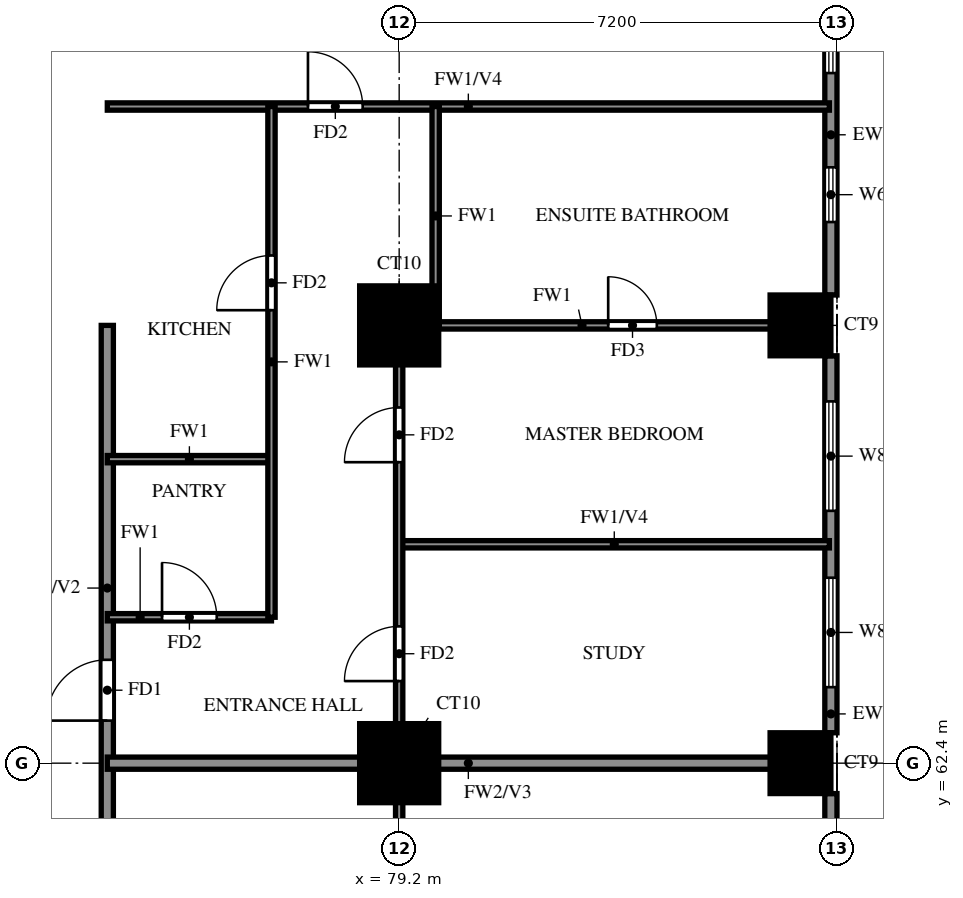
"""IFC4 building model, lengths in metres.
Left out: names, types, materials, properties, quantities, classifications, styles, units other than length and angle.
Written with IfcOpenShell. Run it as: python <this file> out.ifc"""

import sys

from ifc_helpers import new_model, si_unit, direction, frame, frame_2d, origin, origin_2d, place, context, subcontext, project, spatial, rectangle, extrude, source, transform, mapped, element, fill, save


model = new_model("IFC4")
c1 = context("Model", 3, precision=1e-05, world=origin(), true_north=direction((0.0, 1.0)))
c2 = subcontext(c1, "Body", "Model", "MODEL_VIEW")
j1 = project(units=[si_unit("LENGTHUNIT", "METRE"), si_unit("PLANEANGLEUNIT", "RADIAN")], contexts=[c1])
p1 = place(None, origin())
s1 = spatial("IfcSite", under=j1, at=p1, CompositionType="ELEMENT")
p2 = place(p1, origin())
s2 = spatial("IfcBuilding", under=s1, at=p2, CompositionType="ELEMENT")
p3 = place(p2, frame((0.0, 0.0, 69.0)))
s3 = spatial("IfcBuildingStorey", under=s2, at=p3, CompositionType="ELEMENT", Elevation=69.0)
m1 = source(origin(), c2, "Body", "SweptSolid", [
    extrude(rectangle(XDim=1.3, YDim=1.3, at=origin_2d()), origin(), (0.0, 0.0, 1.0), 3.18),
])
p4 = place(p3, frame((79.2, 62.4, 0.0), z_axis=(0.0, 0.0, 1.0), x_axis=(1.0, 0.0, 0.0)))
e1 = element("IfcColumn", 1, at=p4, inside=s3, PredefinedType="COLUMN", context=c2, shape_type="MappedRepresentation", body=[
    mapped(m1, transform((0.0, 0.0, 0.0))),
])
m2 = source(origin(), c2, "Body", "SweptSolid", [
    extrude(rectangle(XDim=1.0, YDim=1.0, at=origin_2d()), origin(), (0.0, 0.0, 1.0), 3.18),
])
p5 = place(p3, frame((85.8, 62.4, 0.0), z_axis=(0.0, 0.0, 1.0), x_axis=(1.0, 0.0, 0.0)))
e2 = element("IfcColumn", 2, at=p5, inside=s3, PredefinedType="COLUMN", context=c2, shape_type="MappedRepresentation", body=[
    mapped(m2, transform((0.0, 0.0, 0.0))),
])
p6 = place(p3, frame((79.2, 69.6, 0.0), z_axis=(0.0, 0.0, 1.0), x_axis=(1.0, 0.0, 0.0)))
e3 = element("IfcColumn", 3, at=p6, inside=s3, PredefinedType="COLUMN", context=c2, shape_type="MappedRepresentation", body=[
    mapped(m1, transform((0.0, 0.0, 0.0))),
])
p7 = place(p3, frame((85.8, 69.6, 0.0), z_axis=(0.0, 0.0, 1.0), x_axis=(1.0, 0.0, 0.0)))
e4 = element("IfcColumn", 4, at=p7, inside=s3, PredefinedType="COLUMN", context=c2, shape_type="MappedRepresentation", body=[
    mapped(m2, transform((0.0, 0.0, 0.0))),
])
p8 = place(p3, frame((86.3, 55.7, 0.0), z_axis=(0.0, 0.0, 1.0), x_axis=(0.0, 1.0, 0.0)))
e5 = element("IfcWall", 5, at=p8, inside=s3, PredefinedType="SOLIDWALL", context=c2, shape_type="SweptSolid", body=[
    extrude(rectangle(XDim=6.2, YDim=0.2, at=frame_2d((3.1, 0.0))), origin(), (0.0, 0.0, 1.0), 3.18),
])
p9 = place(p8, frame((0.4, 0.0, 0.0)))
e6 = element("IfcOpeningElement", 6, at=p9, cuts=e5, PredefinedType="OPENING", context=c2, shape_type="SweptSolid", body=[
    extrude(rectangle(XDim=1.8, YDim=2.4, at=frame_2d((0.9, 1.2))), frame((0.0, 0.11, 0.0), z_axis=(0.0, -1.0, 0.0), x_axis=(1.0, 0.0, 0.0)), (0.0, 0.0, 1.0), 0.22),
])
p10 = place(p8, frame((2.65, 0.0, 0.6)))
e7 = element("IfcOpeningElement", 7, at=p10, cuts=e5, PredefinedType="OPENING", context=c2, shape_type="SweptSolid", body=[
    extrude(rectangle(XDim=0.9, YDim=2.4, at=frame_2d((0.45, 1.2))), frame((0.0, 0.11, 0.0), z_axis=(0.0, -1.0, 0.0), x_axis=(1.0, 0.0, 0.0)), (0.0, 0.0, 1.0), 0.22),
])
p11 = place(p8, frame((4.55, 0.0, 0.6)))
e8 = element("IfcOpeningElement", 8, at=p11, cuts=e5, PredefinedType="OPENING", context=c2, shape_type="SweptSolid", body=[
    extrude(rectangle(XDim=1.2, YDim=2.4, at=frame_2d((0.6, 1.2))), frame((0.0, 0.11, 0.0), z_axis=(0.0, -1.0, 0.0), x_axis=(1.0, 0.0, 0.0)), (0.0, 0.0, 1.0), 0.22),
])
p12 = place(p3, frame((86.3, 62.9, 0.0), z_axis=(0.0, 0.0, 1.0), x_axis=(0.0, 1.0, 0.0)))
e9 = element("IfcWall", 9, at=p12, inside=s3, PredefinedType="SOLIDWALL", context=c2, shape_type="SweptSolid", body=[
    extrude(rectangle(XDim=6.2, YDim=0.2, at=frame_2d((3.1, 0.0))), origin(), (0.0, 0.0, 1.0), 3.18),
])
p13 = place(p12, frame((0.75, 0.0, 0.6)))
e10 = element("IfcOpeningElement", 10, at=p13, cuts=e9, PredefinedType="OPENING", context=c2, shape_type="SweptSolid", body=[
    extrude(rectangle(XDim=1.8, YDim=2.4, at=frame_2d((0.9, 1.2))), frame((0.0, 0.11, 0.0), z_axis=(0.0, -1.0, 0.0), x_axis=(1.0, 0.0, 0.0)), (0.0, 0.0, 1.0), 0.22),
])
p14 = place(p12, frame((3.65, 0.0, 0.6)))
e11 = element("IfcOpeningElement", 11, at=p14, cuts=e9, PredefinedType="OPENING", context=c2, shape_type="SweptSolid", body=[
    extrude(rectangle(XDim=1.8, YDim=2.4, at=frame_2d((0.9, 1.2))), frame((0.0, 0.11, 0.0), z_axis=(0.0, -1.0, 0.0), x_axis=(1.0, 0.0, 0.0)), (0.0, 0.0, 1.0), 0.22),
])
p15 = place(p3, frame((86.3, 70.1, 0.0), z_axis=(0.0, 0.0, 1.0), x_axis=(0.0, 1.0, 0.0)))
e12 = element("IfcWall", 12, at=p15, inside=s3, PredefinedType="SOLIDWALL", context=c2, shape_type="SweptSolid", body=[
    extrude(rectangle(XDim=6.2, YDim=0.2, at=frame_2d((3.1, 0.0))), origin(), (0.0, 0.0, 1.0), 3.18),
])
p16 = place(p15, frame((1.2, 0.0, 1.5)))
e13 = element("IfcOpeningElement", 13, at=p16, cuts=e12, PredefinedType="OPENING", context=c2, shape_type="SweptSolid", body=[
    extrude(rectangle(XDim=0.9, YDim=0.9, at=frame_2d((0.45, 0.45))), frame((0.0, 0.11, 0.0), z_axis=(0.0, -1.0, 0.0), x_axis=(1.0, 0.0, 0.0)), (0.0, 0.0, 1.0), 0.22),
])
p17 = place(p15, frame((3.65, 0.0, 0.6)))
e14 = element("IfcOpeningElement", 14, at=p17, cuts=e12, PredefinedType="OPENING", context=c2, shape_type="SweptSolid", body=[
    extrude(rectangle(XDim=1.8, YDim=2.4, at=frame_2d((0.9, 1.2))), frame((0.0, 0.11, 0.0), z_axis=(0.0, -1.0, 0.0), x_axis=(1.0, 0.0, 0.0)), (0.0, 0.0, 1.0), 0.22),
])
p18 = place(p3, frame((74.4, 60.0, 0.0), z_axis=(0.0, 0.0, 1.0), x_axis=(0.0, 1.0, 0.0)))
e15 = element("IfcWall", 15, at=p18, inside=s3, PredefinedType="SOLIDWALL", context=c2, shape_type="SweptSolid", body=[
    extrude(rectangle(XDim=9.6, YDim=0.2, at=frame_2d((4.8, 0.0))), origin(), (0.0, 0.0, 1.0), 3.18),
])
p19 = place(p18, frame((3.1, 0.0, 0.0)))
e16 = element("IfcOpeningElement", 16, at=p19, cuts=e15, PredefinedType="OPENING", context=c2, shape_type="SweptSolid", body=[
    extrude(rectangle(XDim=1.0, YDim=2.1, at=frame_2d((0.5, 1.05))), frame((0.0, 0.11, 0.0), z_axis=(0.0, -1.0, 0.0), x_axis=(1.0, 0.0, 0.0)), (0.0, 0.0, 1.0), 0.22),
])
p20 = place(p3, frame((74.4, 62.4, 0.0), z_axis=(0.0, 0.0, 1.0), x_axis=(1.0, 0.0, 0.0)))
e17 = element("IfcWall", 17, at=p20, inside=s3, PredefinedType="SOLIDWALL", context=c2, shape_type="SweptSolid", body=[
    extrude(rectangle(XDim=11.875, YDim=0.2, at=frame_2d((5.938, 0.0))), origin(), (0.0, 0.0, 1.0), 3.18),
])
p21 = place(p3, frame((74.4, 64.8, 0.0), z_axis=(0.0, 0.0, 1.0), x_axis=(1.0, 0.0, 0.0)))
e18 = element("IfcWall", 18, at=p21, inside=s3, PredefinedType="PARTITIONING", context=c2, shape_type="SweptSolid", body=[
    extrude(rectangle(XDim=2.7, YDim=0.12, at=frame_2d((1.35, 0.0))), origin(), (0.0, 0.0, 1.0), 3.18),
])
p22 = place(p21, frame((0.9, 0.0, 0.0)))
e19 = element("IfcOpeningElement", 19, at=p22, cuts=e18, PredefinedType="OPENING", context=c2, shape_type="SweptSolid", body=[
    extrude(rectangle(XDim=0.9, YDim=2.1, at=frame_2d((0.45, 1.05))), frame((0.0, 0.07, 0.0), z_axis=(0.0, -1.0, 0.0), x_axis=(1.0, 0.0, 0.0)), (0.0, 0.0, 1.0), 0.14),
])
p23 = place(p3, frame((79.2, 66.0, 0.0), z_axis=(0.0, 0.0, 1.0), x_axis=(1.0, 0.0, 0.0)))
e20 = element("IfcWall", 20, at=p23, inside=s3, PredefinedType="PARTITIONING", context=c2, shape_type="SweptSolid", body=[
    extrude(rectangle(XDim=7.075, YDim=0.12, at=frame_2d((3.538, 0.0))), origin(), (0.0, 0.0, 1.0), 2.28),
])
p24 = place(p3, frame((74.4, 67.4, 0.0), z_axis=(0.0, 0.0, 1.0), x_axis=(1.0, 0.0, 0.0)))
e21 = element("IfcWall", 21, at=p24, inside=s3, PredefinedType="PARTITIONING", context=c2, shape_type="SweptSolid", body=[
    extrude(rectangle(XDim=2.7, YDim=0.12, at=frame_2d((1.35, 0.0))), origin(), (0.0, 0.0, 1.0), 3.18),
])
p25 = place(p3, frame((79.2, 69.6, 0.0), z_axis=(0.0, 0.0, 1.0), x_axis=(1.0, 0.0, 0.0)))
e22 = element("IfcWall", 22, at=p25, inside=s3, PredefinedType="PARTITIONING", context=c2, shape_type="SweptSolid", body=[
    extrude(rectangle(XDim=7.075, YDim=0.12, at=frame_2d((3.538, 0.0))), origin(), (0.0, 0.0, 1.0), 3.18),
])
p26 = place(p25, frame((3.438, 0.0, 0.0)))
e23 = element("IfcOpeningElement", 23, at=p26, cuts=e22, PredefinedType="OPENING", context=c2, shape_type="SweptSolid", body=[
    extrude(rectangle(XDim=0.8, YDim=2.1, at=frame_2d((0.4, 1.05))), frame((0.0, 0.07, 0.0), z_axis=(0.0, -1.0, 0.0), x_axis=(1.0, 0.0, 0.0)), (0.0, 0.0, 1.0), 0.14),
])
p27 = place(p3, frame((74.4, 73.2, 0.0), z_axis=(0.0, 0.0, 1.0), x_axis=(1.0, 0.0, 0.0)))
e24 = element("IfcWall", 24, at=p27, inside=s3, PredefinedType="PARTITIONING", context=c2, shape_type="SweptSolid", body=[
    extrude(rectangle(XDim=11.875, YDim=0.12, at=frame_2d((5.938, 0.0))), origin(), (0.0, 0.0, 1.0), 2.28),
])
p28 = place(p27, frame((3.3, 0.0, 0.0)))
e25 = element("IfcOpeningElement", 25, at=p28, cuts=e24, PredefinedType="OPENING", context=c2, shape_type="SweptSolid", body=[
    extrude(rectangle(XDim=0.9, YDim=2.1, at=frame_2d((0.45, 1.05))), frame((0.0, 0.07, 0.0), z_axis=(0.0, -1.0, 0.0), x_axis=(1.0, 0.0, 0.0)), (0.0, 0.0, 1.0), 0.14),
])
p29 = place(p3, frame((77.1, 64.8, 0.0), z_axis=(0.0, 0.0, 1.0), x_axis=(0.0, 1.0, 0.0)))
e26 = element("IfcWall", 26, at=p29, inside=s3, PredefinedType="PARTITIONING", context=c2, shape_type="SweptSolid", body=[
    extrude(rectangle(XDim=8.4, YDim=0.12, at=frame_2d((4.2, 0.0))), origin(), (0.0, 0.0, 1.0), 3.18),
])
p30 = place(p29, frame((5.05, 0.0, 0.0)))
e27 = element("IfcOpeningElement", 27, at=p30, cuts=e26, PredefinedType="OPENING", context=c2, shape_type="SweptSolid", body=[
    extrude(rectangle(XDim=0.9, YDim=2.1, at=frame_2d((0.45, 1.05))), frame((0.0, 0.07, 0.0), z_axis=(0.0, -1.0, 0.0), x_axis=(1.0, 0.0, 0.0)), (0.0, 0.0, 1.0), 0.14),
])
p31 = place(p3, frame((79.2, 48.125, 0.0), z_axis=(0.0, 0.0, 1.0), x_axis=(0.0, 1.0, 0.0)))
e28 = element("IfcWall", 28, at=p31, inside=s3, PredefinedType="PARTITIONING", context=c2, shape_type="SweptSolid", body=[
    extrude(rectangle(XDim=21.475, YDim=0.12, at=frame_2d((10.738, 0.0))), origin(), (0.0, 0.0, 1.0), 3.18),
])
p32 = place(p31, frame((1.288, 0.0, 0.0)))
e29 = element("IfcOpeningElement", 29, at=p32, cuts=e28, PredefinedType="OPENING", context=c2, shape_type="SweptSolid", body=[
    extrude(rectangle(XDim=0.9, YDim=2.1, at=frame_2d((0.45, 1.05))), frame((0.0, 0.07, 0.0), z_axis=(0.0, -1.0, 0.0), x_axis=(1.0, 0.0, 0.0)), (0.0, 0.0, 1.0), 0.14),
])
p33 = place(p31, frame((4.825, 0.0, 0.0)))
e30 = element("IfcOpeningElement", 30, at=p33, cuts=e28, PredefinedType="OPENING", context=c2, shape_type="SweptSolid", body=[
    extrude(rectangle(XDim=0.9, YDim=2.1, at=frame_2d((0.45, 1.05))), frame((0.0, 0.07, 0.0), z_axis=(0.0, -1.0, 0.0), x_axis=(1.0, 0.0, 0.0)), (0.0, 0.0, 1.0), 0.14),
])
p34 = place(p31, frame((9.925, 0.0, 0.0)))
e31 = element("IfcOpeningElement", 31, at=p34, cuts=e28, PredefinedType="OPENING", context=c2, shape_type="SweptSolid", body=[
    extrude(rectangle(XDim=1.5, YDim=2.1, at=frame_2d((0.75, 1.05))), frame((0.0, 0.07, 0.0), z_axis=(0.0, -1.0, 0.0), x_axis=(1.0, 0.0, 0.0)), (0.0, 0.0, 1.0), 0.14),
])
p35 = place(p31, frame((15.625, 0.0, 0.0)))
e32 = element("IfcOpeningElement", 32, at=p35, cuts=e28, PredefinedType="OPENING", context=c2, shape_type="SweptSolid", body=[
    extrude(rectangle(XDim=0.9, YDim=2.1, at=frame_2d((0.45, 1.05))), frame((0.0, 0.07, 0.0), z_axis=(0.0, -1.0, 0.0), x_axis=(1.0, 0.0, 0.0)), (0.0, 0.0, 1.0), 0.14),
])
p36 = place(p31, frame((19.225, 0.0, 0.0)))
e33 = element("IfcOpeningElement", 33, at=p36, cuts=e28, PredefinedType="OPENING", context=c2, shape_type="SweptSolid", body=[
    extrude(rectangle(XDim=0.9, YDim=2.1, at=frame_2d((0.45, 1.05))), frame((0.0, 0.07, 0.0), z_axis=(0.0, -1.0, 0.0), x_axis=(1.0, 0.0, 0.0)), (0.0, 0.0, 1.0), 0.14),
])
p37 = place(p3, frame((79.8, 69.6, 0.0), z_axis=(0.0, 0.0, 1.0), x_axis=(0.0, 1.0, 0.0)))
e34 = element("IfcWall", 34, at=p37, inside=s3, PredefinedType="PARTITIONING", context=c2, shape_type="SweptSolid", body=[
    extrude(rectangle(XDim=3.6, YDim=0.12, at=frame_2d((1.8, 0.0))), origin(), (0.0, 0.0, 1.0), 3.18),
])
p38 = place(p13, origin())
e35 = element("IfcWindow", 35, at=p38, inside=s3, PartitioningType="DOUBLE_PANEL_VERTICAL", PredefinedType="WINDOW", context=c2, shape_type="SweptSolid", body=[
    extrude(rectangle(XDim=1.8, YDim=2.4, at=frame_2d((0.9, 1.2))), frame((0.0, 0.03, 0.0), z_axis=(0.0, -1.0, 0.0), x_axis=(1.0, 0.0, 0.0)), (0.0, 0.0, 1.0), 0.06),
])
fill(e10, e35)
p39 = place(p14, origin())
e36 = element("IfcWindow", 36, at=p39, inside=s3, PartitioningType="DOUBLE_PANEL_VERTICAL", PredefinedType="WINDOW", context=c2, shape_type="SweptSolid", body=[
    extrude(rectangle(XDim=1.8, YDim=2.4, at=frame_2d((0.9, 1.2))), frame((0.0, 0.03, 0.0), z_axis=(0.0, -1.0, 0.0), x_axis=(1.0, 0.0, 0.0)), (0.0, 0.0, 1.0), 0.06),
])
fill(e11, e36)
p40 = place(p16, origin())
e37 = element("IfcWindow", 37, at=p40, inside=s3, PartitioningType="SINGLE_PANEL", PredefinedType="WINDOW", context=c2, shape_type="SweptSolid", body=[
    extrude(rectangle(XDim=0.9, YDim=0.9, at=frame_2d((0.45, 0.45))), frame((0.0, 0.03, 0.0), z_axis=(0.0, -1.0, 0.0), x_axis=(1.0, 0.0, 0.0)), (0.0, 0.0, 1.0), 0.06),
])
fill(e13, e37)
p41 = place(p17, origin())
e38 = element("IfcWindow", 38, at=p41, inside=s3, PartitioningType="DOUBLE_PANEL_VERTICAL", PredefinedType="WINDOW", context=c2, shape_type="SweptSolid", body=[
    extrude(rectangle(XDim=1.8, YDim=2.4, at=frame_2d((0.9, 1.2))), frame((0.0, 0.03, 0.0), z_axis=(0.0, -1.0, 0.0), x_axis=(1.0, 0.0, 0.0)), (0.0, 0.0, 1.0), 0.06),
])
fill(e14, e38)
p42 = place(p19, origin())
e39 = element("IfcDoor", 39, at=p42, inside=s3, OperationType="SINGLE_SWING_LEFT", PredefinedType="DOOR", context=c2, shape_type="SweptSolid", body=[
    extrude(rectangle(XDim=1.0, YDim=2.1, at=frame_2d((0.5, 1.05))), frame((0.0, 0.025, 0.0), z_axis=(0.0, -1.0, 0.0), x_axis=(1.0, 0.0, 0.0)), (0.0, 0.0, 1.0), 0.05),
])
fill(e16, e39)
p43 = place(p35, origin())
e40 = element("IfcDoor", 40, at=p43, inside=s3, OperationType="SINGLE_SWING_RIGHT", PredefinedType="DOOR", context=c2, shape_type="SweptSolid", body=[
    extrude(rectangle(XDim=0.9, YDim=2.1, at=frame_2d((0.45, 1.05))), frame((0.0, 0.025, 0.0), z_axis=(0.0, -1.0, 0.0), x_axis=(1.0, 0.0, 0.0)), (0.0, 0.0, 1.0), 0.05),
])
fill(e32, e40)
p44 = place(p36, origin())
e41 = element("IfcDoor", 41, at=p44, inside=s3, OperationType="SINGLE_SWING_LEFT", PredefinedType="DOOR", context=c2, shape_type="SweptSolid", body=[
    extrude(rectangle(XDim=0.9, YDim=2.1, at=frame_2d((0.45, 1.05))), frame((0.0, 0.025, 0.0), z_axis=(0.0, -1.0, 0.0), x_axis=(1.0, 0.0, 0.0)), (0.0, 0.0, 1.0), 0.05),
])
fill(e33, e41)
p45 = place(p26, origin())
e42 = element("IfcDoor", 42, at=p45, inside=s3, OperationType="SINGLE_SWING_LEFT", PredefinedType="DOOR", context=c2, shape_type="SweptSolid", body=[
    extrude(rectangle(XDim=0.8, YDim=2.1, at=frame_2d((0.4, 1.05))), frame((0.0, 0.025, 0.0), z_axis=(0.0, -1.0, 0.0), x_axis=(1.0, 0.0, 0.0)), (0.0, 0.0, 1.0), 0.05),
])
fill(e23, e42)
p46 = place(p28, origin())
e43 = element("IfcDoor", 43, at=p46, inside=s3, OperationType="SINGLE_SWING_RIGHT", PredefinedType="DOOR", context=c2, shape_type="SweptSolid", body=[
    extrude(rectangle(XDim=0.9, YDim=2.1, at=frame_2d((0.45, 1.05))), frame((0.0, 0.025, 0.0), z_axis=(0.0, -1.0, 0.0), x_axis=(1.0, 0.0, 0.0)), (0.0, 0.0, 1.0), 0.05),
])
fill(e25, e43)
p47 = place(p22, origin())
e44 = element("IfcDoor", 44, at=p47, inside=s3, OperationType="SINGLE_SWING_LEFT", PredefinedType="DOOR", context=c2, shape_type="SweptSolid", body=[
    extrude(rectangle(XDim=0.9, YDim=2.1, at=frame_2d((0.45, 1.05))), frame((0.0, 0.025, 0.0), z_axis=(0.0, -1.0, 0.0), x_axis=(1.0, 0.0, 0.0)), (0.0, 0.0, 1.0), 0.05),
])
fill(e19, e44)
p48 = place(p30, origin())
e45 = element("IfcDoor", 45, at=p48, inside=s3, OperationType="SINGLE_SWING_LEFT", PredefinedType="DOOR", context=c2, shape_type="SweptSolid", body=[
    extrude(rectangle(XDim=0.9, YDim=2.1, at=frame_2d((0.45, 1.05))), frame((0.0, 0.025, 0.0), z_axis=(0.0, -1.0, 0.0), x_axis=(1.0, 0.0, 0.0)), (0.0, 0.0, 1.0), 0.05),
])
fill(e27, e45)
save(model, sys.argv[1])
